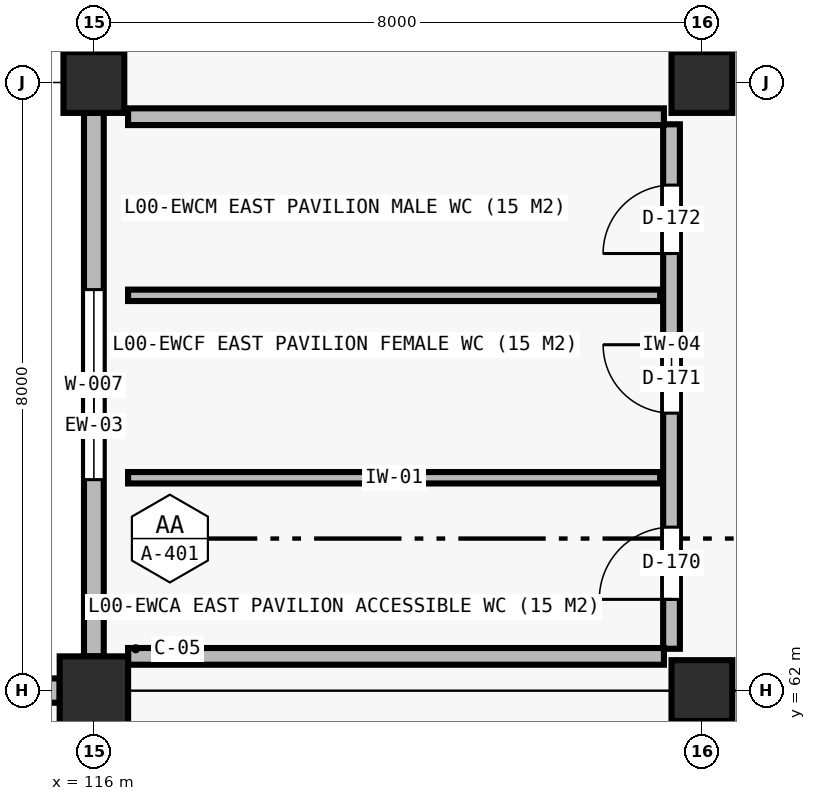
"""IFC4 building model, lengths in metres.
Left out: names, types, materials, properties, quantities, classifications, styles, units other than length and angle.
Written with IfcOpenShell. Run it as: python <this file> out.ifc"""

import sys

from ifc_helpers import new_model, si_unit, direction, frame, frame_2d, origin, origin_2d, place, context, subcontext, project, spatial, rectangle, extrude, element, fill, save


model = new_model("IFC4")
c1 = context("Model", 3, precision=1e-05, world=origin(), true_north=direction((0.0, 1.0)))
c2 = subcontext(c1, "Body", "Model", "MODEL_VIEW")
j1 = project(units=[si_unit("LENGTHUNIT", "METRE"), si_unit("PLANEANGLEUNIT", "RADIAN")], contexts=[c1])
p1 = place(None, origin())
s1 = spatial("IfcSite", under=j1, at=p1, CompositionType="ELEMENT")
p2 = place(p1, origin())
s2 = spatial("IfcBuilding", under=s1, at=p2, CompositionType="ELEMENT")
p3 = place(p2, origin())
s3 = spatial("IfcBuildingStorey", under=s2, at=p3, CompositionType="ELEMENT", Elevation=0.0)
p4 = place(p3, frame((116.0, 62.0, 0.0), z_axis=(0.0, 0.0, 1.0), x_axis=(1.0, 0.0, 0.0)))
e1 = element("IfcColumn", 1, at=p4, inside=s3, PredefinedType="COLUMN", context=c2, shape_type="SweptSolid", body=[
    extrude(rectangle(XDim=0.9, YDim=0.9, at=origin_2d()), origin(), (0.0, 0.0, 1.0), 6.02),
])
for number, where, z_axis, x_axis in (
    (2, (116.0, 70.0, 0.0), (0.0, 0.0, 1.0), (1.0, 0.0, 0.0)),
    (3, (124.0, 62.0, 0.0), (0.0, 0.0, 1.0), (1.0, 0.0, 0.0)),
    (4, (124.0, 70.0, 0.0), (0.0, 0.0, 1.0), (1.0, 0.0, 0.0)),
):
    element("IfcColumn", number, at=place(p3, frame(where, z_axis=z_axis, x_axis=x_axis)), inside=s3, PredefinedType="COLUMN", context=c2, shape_type="SweptSolid", body=[
        extrude(rectangle(XDim=0.8, YDim=0.8, at=origin_2d()), origin(), (0.0, 0.0, 1.0), 6.02),
    ])
p5 = place(p3, frame((108.6, 62.0, 0.0), z_axis=(0.0, 0.0, 1.0), x_axis=(1.0, 0.0, 0.0)))
e5 = element("IfcWall", 5, at=p5, inside=s3, PredefinedType="STANDARD", context=c2, shape_type="SweptSolid", body=[
    extrude(rectangle(XDim=6.95, YDim=0.32, at=frame_2d((3.475, 0.0))), origin(), (0.0, 0.0, 1.0), 4.92),
])
p6 = place(p5, frame((2.275, 0.0, 0.0)))
e6 = element("IfcOpeningElement", 6, at=p6, cuts=e5, PredefinedType="OPENING", context=c2, shape_type="SweptSolid", body=[
    extrude(rectangle(XDim=2.4, YDim=2.6, at=frame_2d((1.2, 1.3))), frame((0.0, 0.17, 0.0), z_axis=(0.0, -1.0, 0.0), x_axis=(1.0, 0.0, 0.0)), (0.0, 0.0, 1.0), 0.34),
])
p7 = place(p3, frame((116.0, 62.45, 0.0), z_axis=(0.0, 0.0, 1.0), x_axis=(0.0, 1.0, 0.0)))
e7 = element("IfcWall", 7, at=p7, inside=s3, PredefinedType="STANDARD", context=c2, shape_type="SweptSolid", body=[
    extrude(rectangle(XDim=7.15, YDim=0.26, at=frame_2d((3.575, 0.0))), origin(), (0.0, 0.0, 1.0), 5.408),
])
p8 = place(p7, frame((2.325, 0.0, 0.95)))
e8 = element("IfcOpeningElement", 8, at=p8, cuts=e7, PredefinedType="OPENING", context=c2, shape_type="SweptSolid", body=[
    extrude(rectangle(XDim=2.5, YDim=2.05, at=frame_2d((1.25, 1.025))), frame((0.0, 0.14, 0.0), z_axis=(0.0, -1.0, 0.0), x_axis=(1.0, 0.0, 0.0)), (0.0, 0.0, 1.0), 0.28),
])
p9 = place(p3, frame((123.6, 62.55, 0.0), z_axis=(0.0, 0.0, 1.0), x_axis=(0.0, 1.0, 0.0)))
e9 = element("IfcWall", 9, at=p9, inside=s3, PredefinedType="PLUMBINGWALL", context=c2, shape_type="SweptSolid", body=[
    extrude(rectangle(XDim=6.9, YDim=0.22, at=frame_2d((3.45, 0.0))), origin(), (0.0, 0.0, 1.0), 6.02),
])
p10 = place(p9, frame((0.65, 0.0, 0.0)))
e10 = element("IfcOpeningElement", 10, at=p10, cuts=e9, PredefinedType="OPENING", context=c2, shape_type="SweptSolid", body=[
    extrude(rectangle(XDim=0.95, YDim=2.1, at=frame_2d((0.475, 1.05))), frame((0.0, 0.12, 0.0), z_axis=(0.0, -1.0, 0.0), x_axis=(1.0, 0.0, 0.0)), (0.0, 0.0, 1.0), 0.24),
])
p11 = place(p9, frame((3.1, 0.0, 0.0)))
e11 = element("IfcOpeningElement", 11, at=p11, cuts=e9, PredefinedType="OPENING", context=c2, shape_type="SweptSolid", body=[
    extrude(rectangle(XDim=0.9, YDim=2.1, at=frame_2d((0.45, 1.05))), frame((0.0, 0.12, 0.0), z_axis=(0.0, -1.0, 0.0), x_axis=(1.0, 0.0, 0.0)), (0.0, 0.0, 1.0), 0.24),
])
p12 = place(p9, frame((5.2, 0.0, 0.0)))
e12 = element("IfcOpeningElement", 12, at=p12, cuts=e9, PredefinedType="OPENING", context=c2, shape_type="SweptSolid", body=[
    extrude(rectangle(XDim=0.9, YDim=2.1, at=frame_2d((0.45, 1.05))), frame((0.0, 0.12, 0.0), z_axis=(0.0, -1.0, 0.0), x_axis=(1.0, 0.0, 0.0)), (0.0, 0.0, 1.0), 0.24),
])
for number, where, z_axis, x_axis in (
    (13, (116.45, 69.55, 0.0), (0.0, 0.0, 1.0), (1.0, 0.0, 0.0)),
    (14, (116.45, 62.45, 0.0), (0.0, 0.0, 1.0), (1.0, 0.0, 0.0)),
):
    element("IfcWall", number, at=place(p3, frame(where, z_axis=z_axis, x_axis=x_axis)), inside=s3, PredefinedType="PLUMBINGWALL", context=c2, shape_type="SweptSolid", body=[
        extrude(rectangle(XDim=7.05, YDim=0.22, at=frame_2d((3.525, 0.0))), origin(), (0.0, 0.0, 1.0), 6.02),
    ])
for number, where, z_axis, x_axis in (
    (15, (116.45, 64.8, 0.0), (0.0, 0.0, 1.0), (1.0, 0.0, 0.0)),
    (16, (116.45, 67.2, 0.0), (0.0, 0.0, 1.0), (1.0, 0.0, 0.0)),
):
    element("IfcWall", number, at=place(p3, frame(where, z_axis=z_axis, x_axis=x_axis)), inside=s3, PredefinedType="PARTITIONING", context=c2, shape_type="SweptSolid", body=[
        extrude(rectangle(XDim=7.0, YDim=0.15, at=frame_2d((3.5, 0.0))), origin(), (0.0, 0.0, 1.0), 6.02),
    ])
p13 = place(p8, origin())
e17 = element("IfcWindow", 17, at=p13, inside=s3, PartitioningType="SINGLE_PANEL", PredefinedType="WINDOW", context=c2, shape_type="SweptSolid", body=[
    extrude(rectangle(XDim=2.5, YDim=2.05, at=frame_2d((1.25, 1.025))), frame((0.0, 0.03, 0.0), z_axis=(0.0, -1.0, 0.0), x_axis=(1.0, 0.0, 0.0)), (0.0, 0.0, 1.0), 0.06),
])
fill(e8, e17)
p14 = place(p10, origin())
e18 = element("IfcDoor", 18, at=p14, inside=s3, OperationType="SINGLE_SWING_LEFT", PredefinedType="DOOR", context=c2, shape_type="SweptSolid", body=[
    extrude(rectangle(XDim=0.95, YDim=2.1, at=frame_2d((0.475, 1.05))), frame((0.0, 0.025, 0.0), z_axis=(0.0, -1.0, 0.0), x_axis=(1.0, 0.0, 0.0)), (0.0, 0.0, 1.0), 0.05),
])
fill(e10, e18)
p15 = place(p11, origin())
e19 = element("IfcDoor", 19, at=p15, inside=s3, OperationType="SINGLE_SWING_RIGHT", PredefinedType="DOOR", context=c2, shape_type="SweptSolid", body=[
    extrude(rectangle(XDim=0.9, YDim=2.1, at=frame_2d((0.45, 1.05))), frame((0.0, 0.025, 0.0), z_axis=(0.0, -1.0, 0.0), x_axis=(1.0, 0.0, 0.0)), (0.0, 0.0, 1.0), 0.05),
])
fill(e11, e19)
p16 = place(p12, origin())
e20 = element("IfcDoor", 20, at=p16, inside=s3, OperationType="SINGLE_SWING_LEFT", PredefinedType="DOOR", context=c2, shape_type="SweptSolid", body=[
    extrude(rectangle(XDim=0.9, YDim=2.1, at=frame_2d((0.45, 1.05))), frame((0.0, 0.025, 0.0), z_axis=(0.0, -1.0, 0.0), x_axis=(1.0, 0.0, 0.0)), (0.0, 0.0, 1.0), 0.05),
])
fill(e12, e20)
save(model, sys.argv[1])
